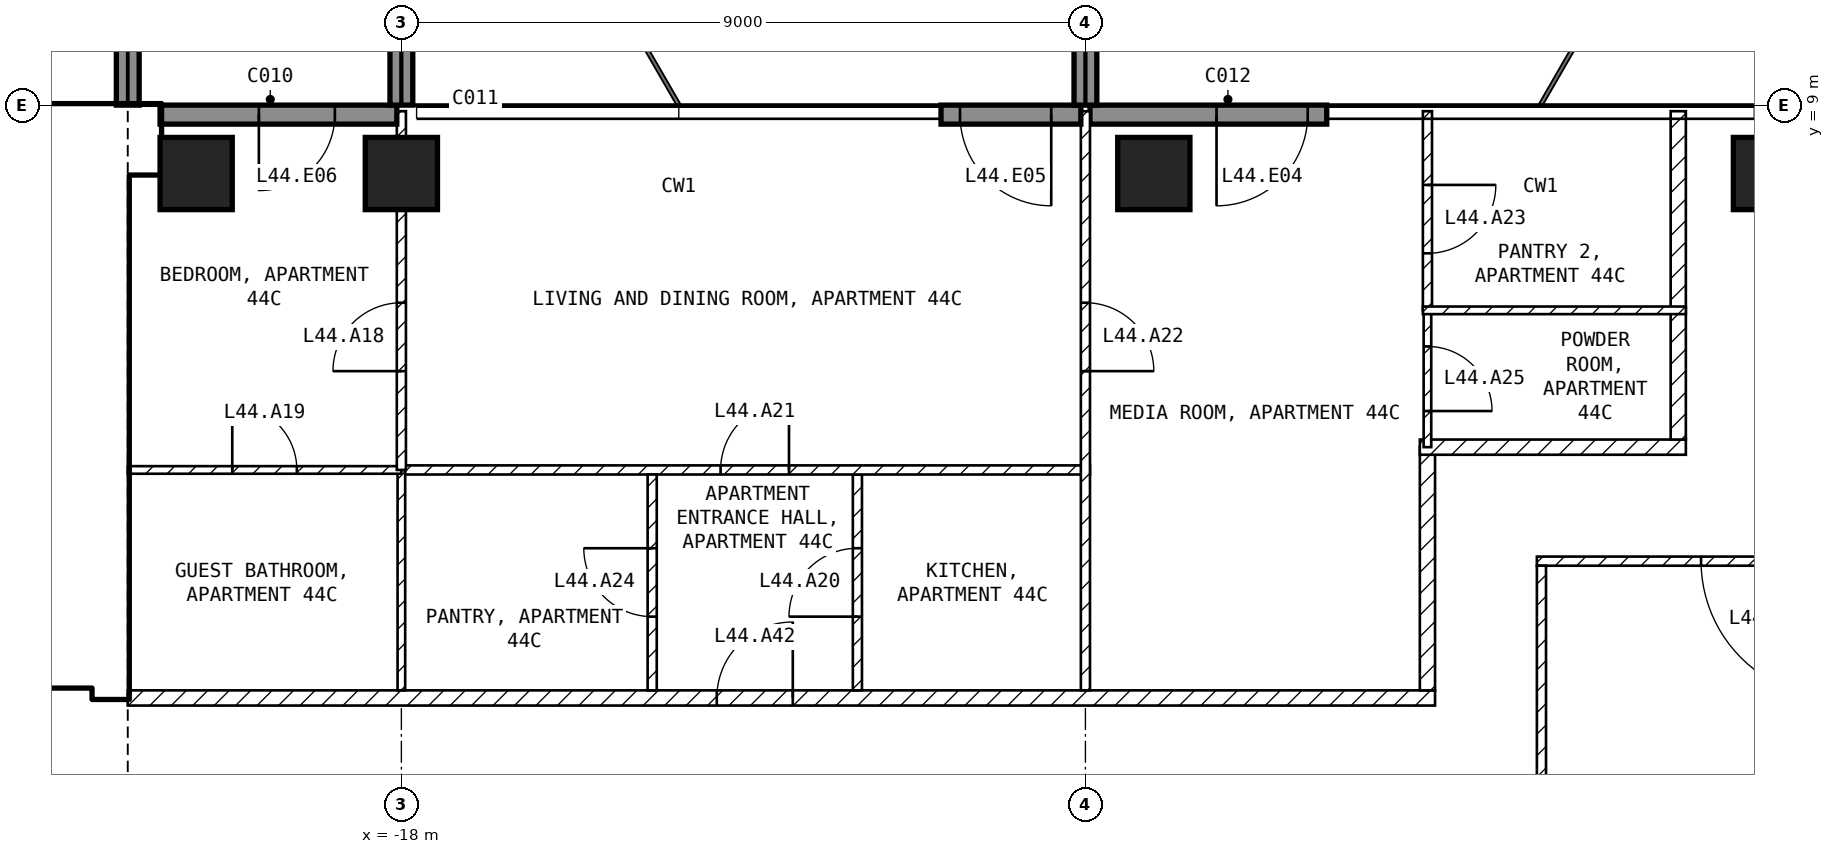
"""IFC4 building model, lengths in metres.
Left out: names, types, materials, properties, quantities, classifications, styles, units other than length and angle.
Written with IfcOpenShell. Run it as: python <this file> out.ifc"""

import sys

from ifc_helpers import new_model, si_unit, direction, frame, frame_2d, origin, origin_2d, place, context, subcontext, project, spatial, rectangle, extrude, element, fill, save


model = new_model("IFC4")
c1 = context("Model", 3, precision=1e-05, world=origin(), true_north=direction((0.0, 1.0)))
c2 = subcontext(c1, "Body", "Model", "MODEL_VIEW")
j1 = project(units=[si_unit("LENGTHUNIT", "METRE"), si_unit("PLANEANGLEUNIT", "RADIAN")], contexts=[c1])
p1 = place(None, origin())
s1 = spatial("IfcSite", under=j1, at=p1, CompositionType="ELEMENT")
p2 = place(p1, origin())
s2 = spatial("IfcBuilding", under=s1, at=p2, CompositionType="ELEMENT")
p3 = place(p2, frame((0.0, 0.0, 180.6)))
s3 = spatial("IfcBuildingStorey", under=s2, at=p3, CompositionType="ELEMENT", Elevation=180.6)
for number, where, z_axis, x_axis in (
    (1, (-20.7, 8.1, -0.25), (0.0, 0.0, 1.0), (1.0, 0.0, 0.0)),
    (2, (-18.0, 8.1, -0.25), (0.0, 0.0, 1.0), (1.0, 0.0, 0.0)),
    (3, (-8.1, 8.1, -0.25), (0.0, 0.0, 1.0), (1.0, 0.0, 0.0)),
    (4, (0.0, 8.1, -0.25), (0.0, 0.0, 1.0), (1.0, 0.0, 0.0)),
):
    element("IfcColumn", number, at=place(p3, frame(where, z_axis=z_axis, x_axis=x_axis)), inside=s3, PredefinedType="COLUMN", context=c2, shape_type="SweptSolid", body=[
        extrude(rectangle(XDim=0.95, YDim=0.95, at=origin_2d()), origin(), (0.0, 0.0, 1.0), 3.5),
    ])
p4 = place(p3, frame((-5.825, 8.875, 0.0), z_axis=(0.0, 0.0, 1.0), x_axis=(-1.0, 0.0, 0.0)))
e5 = element("IfcWall", 5, at=p4, inside=s3, PredefinedType="SOLIDWALL", context=c2, shape_type="SweptSolid", body=[
    extrude(rectangle(XDim=3.115, YDim=0.25, at=frame_2d((1.558, 0.0))), origin(), (0.0, 0.0, 1.0), 3.25),
])
p5 = place(p4, frame((0.25, 0.0, 0.0)))
e6 = element("IfcOpeningElement", 6, at=p5, cuts=e5, PredefinedType="OPENING", context=c2, shape_type="SweptSolid", body=[
    extrude(rectangle(XDim=1.2, YDim=2.4, at=frame_2d((0.6, 1.2))), frame((0.0, 0.135, 0.0), z_axis=(0.0, -1.0, 0.0), x_axis=(1.0, 0.0, 0.0)), (0.0, 0.0, 1.0), 0.27),
])
p6 = place(p3, frame((-9.06, 8.875, 0.0), z_axis=(0.0, 0.0, 1.0), x_axis=(-1.0, 0.0, 0.0)))
e7 = element("IfcWall", 7, at=p6, inside=s3, PredefinedType="SOLIDWALL", context=c2, shape_type="SweptSolid", body=[
    extrude(rectangle(XDim=1.84, YDim=0.25, at=frame_2d((0.92, 0.0))), origin(), (0.0, 0.0, 1.0), 3.25),
])
p7 = place(p6, frame((0.39, 0.0, 0.0)))
e8 = element("IfcOpeningElement", 8, at=p7, cuts=e7, PredefinedType="OPENING", context=c2, shape_type="SweptSolid", body=[
    extrude(rectangle(XDim=1.2, YDim=2.4, at=frame_2d((0.6, 1.2))), frame((0.0, 0.135, 0.0), z_axis=(0.0, -1.0, 0.0), x_axis=(1.0, 0.0, 0.0)), (0.0, 0.0, 1.0), 0.27),
])
p8 = place(p3, frame((-18.06, 8.875, 0.0), z_axis=(0.0, 0.0, 1.0), x_axis=(-1.0, 0.0, 0.0)))
e9 = element("IfcWall", 9, at=p8, inside=s3, PredefinedType="SOLIDWALL", context=c2, shape_type="SweptSolid", body=[
    extrude(rectangle(XDim=3.115, YDim=0.25, at=frame_2d((1.558, 0.0))), origin(), (0.0, 0.0, 1.0), 3.25),
])
p9 = place(p8, frame((0.815, 0.0, 0.0)))
e10 = element("IfcOpeningElement", 10, at=p9, cuts=e9, PredefinedType="OPENING", context=c2, shape_type="SweptSolid", body=[
    extrude(rectangle(XDim=1.0, YDim=2.4, at=frame_2d((0.5, 1.2))), frame((0.0, 0.135, 0.0), z_axis=(0.0, -1.0, 0.0), x_axis=(1.0, 0.0, 0.0)), (0.0, 0.0, 1.0), 0.27),
])
for number, where, z_axis, x_axis in (
    (11, (-21.6, 9.0, 0.0), (0.0, 0.0, 1.0), (0.0, 1.0, 0.0)),
    (12, (-18.0, 9.0, 0.0), (0.0, 0.0, 1.0), (0.0, 1.0, 0.0)),
    (13, (-9.0, 9.0, 0.0), (0.0, 0.0, 1.0), (0.0, 1.0, 0.0)),
):
    element("IfcWall", number, at=place(p3, frame(where, z_axis=z_axis, x_axis=x_axis)), inside=s3, PredefinedType="SOLIDWALL", context=c2, shape_type="SweptSolid", body=[
        extrude(rectangle(XDim=2.7, YDim=0.3, at=frame_2d((1.35, 0.0))), origin(), (0.0, 0.0, 1.0), 3.25),
    ])
p10 = place(p3, frame((-29.6, 8.55, 0.0), z_axis=(0.0, 0.0, 1.0), x_axis=(1.0, 0.0, 0.0)))
e14 = element("IfcWall", 14, at=p10, inside=s3, PredefinedType="SHEAR", context=c2, shape_type="SweptSolid", body=[
    extrude(rectangle(XDim=8.425, YDim=0.9, at=frame_2d((4.212, 0.0))), origin(), (0.0, 0.0, 1.0), 3.25),
])
p11 = place(p3, frame((-21.825, 1.2, 0.0), z_axis=(0.0, 0.0, 1.0), x_axis=(0.0, 1.0, 0.0)))
e15 = element("IfcWall", 15, at=p11, inside=s3, PredefinedType="SHEAR", context=c2, shape_type="SweptSolid", body=[
    extrude(rectangle(XDim=6.9, YDim=0.45, at=frame_2d((3.45, 0.0))), origin(), (0.0, 0.0, 1.0), 3.25),
])
p12 = place(p3, frame((-33.2, 1.45, 0.0), z_axis=(0.0, 0.0, 1.0), x_axis=(1.0, 0.0, 0.0)))
e16 = element("IfcWall", 16, at=p12, inside=s3, PredefinedType="SOLIDWALL", context=c2, shape_type="SweptSolid", body=[
    extrude(rectangle(XDim=11.15, YDim=0.2, at=frame_2d((5.575, 0.0))), origin(), (0.0, 0.0, 1.0), 3.25),
])
p13 = place(p12, frame((9.4, 0.0, 0.0)))
e17 = element("IfcOpeningElement", 17, at=p13, cuts=e16, PredefinedType="OPENING", context=c2, shape_type="SweptSolid", body=[
    extrude(rectangle(XDim=1.0, YDim=2.1, at=frame_2d((0.5, 1.05))), frame((0.0, 0.11, 0.0), z_axis=(0.0, -1.0, 0.0), x_axis=(1.0, 0.0, 0.0)), (0.0, 0.0, 1.0), 0.22),
])
p14 = place(p12, frame((6.9, 0.0, 0.0)))
e18 = element("IfcOpeningElement", 18, at=p14, cuts=e16, PredefinedType="OPENING", context=c2, shape_type="SweptSolid", body=[
    extrude(rectangle(XDim=1.0, YDim=2.1, at=frame_2d((0.5, 1.05))), frame((0.0, 0.11, 0.0), z_axis=(0.0, -1.0, 0.0), x_axis=(1.0, 0.0, 0.0)), (0.0, 0.0, 1.0), 0.22),
])
p15 = place(p12, frame((1.1, 0.0, 0.0)))
e19 = element("IfcOpeningElement", 19, at=p15, cuts=e16, PredefinedType="OPENING", context=c2, shape_type="SweptSolid", body=[
    extrude(rectangle(XDim=0.9, YDim=2.1, at=frame_2d((0.45, 1.05))), frame((0.0, 0.11, 0.0), z_axis=(0.0, -1.0, 0.0), x_axis=(1.0, 0.0, 0.0)), (0.0, 0.0, 1.0), 0.22),
])
p16 = place(p3, frame((-28.35, 5.15, 0.0), z_axis=(0.0, 0.0, 1.0), x_axis=(1.0, 0.0, 0.0)))
e20 = element("IfcWall", 20, at=p16, inside=s3, PredefinedType="SOLIDWALL", context=c2, shape_type="SweptSolid", body=[
    extrude(rectangle(XDim=6.3, YDim=0.2, at=frame_2d((3.15, 0.0))), origin(), (0.0, 0.0, 1.0), 3.25),
])
p17 = place(p16, frame((5.1, 0.0, 0.0)))
e21 = element("IfcOpeningElement", 21, at=p17, cuts=e20, PredefinedType="OPENING", context=c2, shape_type="SweptSolid", body=[
    extrude(rectangle(XDim=1.0, YDim=2.1, at=frame_2d((0.5, 1.05))), frame((0.0, 0.11, 0.0), z_axis=(0.0, -1.0, 0.0), x_axis=(1.0, 0.0, 0.0)), (0.0, 0.0, 1.0), 0.22),
])
p18 = place(p3, frame((3.06, 3.0, 0.0), z_axis=(0.0, 0.0, 1.0), x_axis=(-1.0, 0.0, 0.0)))
e22 = element("IfcWall", 22, at=p18, inside=s3, PredefinedType="PARTITIONING", context=c2, shape_type="SweptSolid", body=[
    extrude(rectangle(XDim=6.12, YDim=0.12, at=frame_2d((3.06, 0.0))), origin(), (0.0, 0.0, 1.0), 3.25),
])
p19 = place(p18, frame((2.16, 0.0, 0.0)))
e23 = element("IfcOpeningElement", 23, at=p19, cuts=e22, PredefinedType="OPENING", context=c2, shape_type="SweptSolid", body=[
    extrude(rectangle(XDim=1.8, YDim=2.1, at=frame_2d((0.9, 1.05))), frame((0.0, 0.07, 0.0), z_axis=(0.0, -1.0, 0.0), x_axis=(1.0, 0.0, 0.0)), (0.0, 0.0, 1.0), 0.14),
])
p20 = place(p3, frame((-3.0, 2.94, 0.0), z_axis=(0.0, 0.0, 1.0), x_axis=(0.0, -1.0, 0.0)))
e24 = element("IfcWall", 24, at=p20, inside=s3, PredefinedType="PARTITIONING", context=c2, shape_type="SweptSolid", body=[
    extrude(rectangle(XDim=5.88, YDim=0.12, at=frame_2d((2.94, 0.0))), origin(), (0.0, 0.0, 1.0), 3.25),
])
p21 = place(p3, frame((-21.6, 1.2, 0.0), z_axis=(0.0, 0.0, 1.0), x_axis=(1.0, 0.0, 0.0)))
e25 = element("IfcWall", 25, at=p21, inside=s3, PredefinedType="PARTITIONING", context=c2, shape_type="SweptSolid", body=[
    extrude(rectangle(XDim=17.2, YDim=0.2, at=frame_2d((8.6, 0.0))), origin(), (0.0, 0.0, 1.0), 3.25),
])
p22 = place(p21, frame((7.75, 0.0, 0.0)))
e26 = element("IfcOpeningElement", 26, at=p22, cuts=e25, PredefinedType="OPENING", context=c2, shape_type="SweptSolid", body=[
    extrude(rectangle(XDim=1.0, YDim=2.1, at=frame_2d((0.5, 1.05))), frame((0.0, 0.11, 0.0), z_axis=(0.0, -1.0, 0.0), x_axis=(1.0, 0.0, 0.0)), (0.0, 0.0, 1.0), 0.22),
])
p23 = place(p3, frame((-4.5, 1.3, 0.0), z_axis=(0.0, 0.0, 1.0), x_axis=(0.0, 1.0, 0.0)))
e27 = element("IfcWall", 27, at=p23, inside=s3, PredefinedType="PARTITIONING", context=c2, shape_type="SweptSolid", body=[
    extrude(rectangle(XDim=3.2, YDim=0.2, at=frame_2d((1.6, 0.0))), origin(), (0.0, 0.0, 1.0), 3.25),
])
p24 = place(p3, frame((-4.6, 4.5, 0.0), z_axis=(0.0, 0.0, 1.0), x_axis=(1.0, 0.0, 0.0)))
e28 = element("IfcWall", 28, at=p24, inside=s3, PredefinedType="PARTITIONING", context=c2, shape_type="SweptSolid", body=[
    extrude(rectangle(XDim=3.5, YDim=0.2, at=frame_2d((1.75, 0.0))), origin(), (0.0, 0.0, 1.0), 3.25),
])
p25 = place(p3, frame((-1.2, 4.6, 0.0), z_axis=(0.0, 0.0, 1.0), x_axis=(0.0, 1.0, 0.0)))
e29 = element("IfcWall", 29, at=p25, inside=s3, PredefinedType="PARTITIONING", context=c2, shape_type="SweptSolid", body=[
    extrude(rectangle(XDim=4.32, YDim=0.2, at=frame_2d((2.16, 0.0))), origin(), (0.0, 0.0, 1.0), 3.25),
])
p26 = place(p3, frame((-12.0, 1.3, 0.0), z_axis=(0.0, 0.0, 1.0), x_axis=(0.0, 1.0, 0.0)))
e30 = element("IfcWall", 30, at=p26, inside=s3, PredefinedType="PARTITIONING", context=c2, shape_type="SweptSolid", body=[
    extrude(rectangle(XDim=2.84, YDim=0.12, at=frame_2d((1.42, 0.0))), origin(), (0.0, 0.0, 1.0), 3.25),
])
p27 = place(p26, frame((0.97, 0.0, 0.0)))
e31 = element("IfcOpeningElement", 31, at=p27, cuts=e30, PredefinedType="OPENING", context=c2, shape_type="SweptSolid", body=[
    extrude(rectangle(XDim=0.9, YDim=2.1, at=frame_2d((0.45, 1.05))), frame((0.0, 0.07, 0.0), z_axis=(0.0, -1.0, 0.0), x_axis=(1.0, 0.0, 0.0)), (0.0, 0.0, 1.0), 0.14),
])
p28 = place(p3, frame((-18.0, 4.2, 0.0), z_axis=(0.0, 0.0, 1.0), x_axis=(1.0, 0.0, 0.0)))
e32 = element("IfcWall", 32, at=p28, inside=s3, PredefinedType="PARTITIONING", context=c2, shape_type="SweptSolid", body=[
    extrude(rectangle(XDim=9.06, YDim=0.12, at=frame_2d((4.53, 0.0))), origin(), (0.0, 0.0, 1.0), 3.25),
])
p29 = place(p28, frame((4.2, 0.0, 0.0)))
e33 = element("IfcOpeningElement", 33, at=p29, cuts=e32, PredefinedType="OPENING", context=c2, shape_type="SweptSolid", body=[
    extrude(rectangle(XDim=0.9, YDim=2.1, at=frame_2d((0.45, 1.05))), frame((0.0, 0.07, 0.0), z_axis=(0.0, -1.0, 0.0), x_axis=(1.0, 0.0, 0.0)), (0.0, 0.0, 1.0), 0.14),
])
p30 = place(p3, frame((-9.0, 8.92, 0.0), z_axis=(0.0, 0.0, 1.0), x_axis=(0.0, -1.0, 0.0)))
e34 = element("IfcWall", 34, at=p30, inside=s3, PredefinedType="PARTITIONING", context=c2, shape_type="SweptSolid", body=[
    extrude(rectangle(XDim=7.62, YDim=0.12, at=frame_2d((3.81, 0.0))), origin(), (0.0, 0.0, 1.0), 3.25),
])
p31 = place(p30, frame((2.52, 0.0, 0.0)))
e35 = element("IfcOpeningElement", 35, at=p31, cuts=e34, PredefinedType="OPENING", context=c2, shape_type="SweptSolid", body=[
    extrude(rectangle(XDim=0.9, YDim=2.1, at=frame_2d((0.45, 1.05))), frame((0.0, 0.07, 0.0), z_axis=(0.0, -1.0, 0.0), x_axis=(1.0, 0.0, 0.0)), (0.0, 0.0, 1.0), 0.14),
])
p32 = place(p3, frame((-14.7, 1.3, 0.0), z_axis=(0.0, 0.0, 1.0), x_axis=(0.0, 1.0, 0.0)))
e36 = element("IfcWall", 36, at=p32, inside=s3, PredefinedType="PARTITIONING", context=c2, shape_type="SweptSolid", body=[
    extrude(rectangle(XDim=2.84, YDim=0.12, at=frame_2d((1.42, 0.0))), origin(), (0.0, 0.0, 1.0), 3.25),
])
p33 = place(p32, frame((0.97, 0.0, 0.0)))
e37 = element("IfcOpeningElement", 37, at=p33, cuts=e36, PredefinedType="OPENING", context=c2, shape_type="SweptSolid", body=[
    extrude(rectangle(XDim=0.9, YDim=2.1, at=frame_2d((0.45, 1.05))), frame((0.0, 0.07, 0.0), z_axis=(0.0, -1.0, 0.0), x_axis=(1.0, 0.0, 0.0)), (0.0, 0.0, 1.0), 0.14),
])
p34 = place(p3, frame((-18.0, 1.3, 0.0), z_axis=(0.0, 0.0, 1.0), x_axis=(0.0, 1.0, 0.0)))
e38 = element("IfcWall", 38, at=p34, inside=s3, PredefinedType="PARTITIONING", context=c2, shape_type="SweptSolid", body=[
    extrude(rectangle(XDim=2.9, YDim=0.1, at=frame_2d((1.45, 0.0))), origin(), (0.0, 0.0, 1.0), 2.48),
])
p35 = place(p3, frame((-21.6, 4.2, 0.0), z_axis=(0.0, 0.0, 1.0), x_axis=(1.0, 0.0, 0.0)))
e39 = element("IfcWall", 39, at=p35, inside=s3, PredefinedType="PARTITIONING", context=c2, shape_type="SweptSolid", body=[
    extrude(rectangle(XDim=3.6, YDim=0.1, at=frame_2d((1.8, 0.0))), origin(), (0.0, 0.0, 1.0), 3.25),
])
p36 = place(p35, frame((1.375, 0.0, 0.0)))
e40 = element("IfcOpeningElement", 40, at=p36, cuts=e39, PredefinedType="OPENING", context=c2, shape_type="SweptSolid", body=[
    extrude(rectangle(XDim=0.85, YDim=2.1, at=frame_2d((0.425, 1.05))), frame((0.0, 0.06, 0.0), z_axis=(0.0, -1.0, 0.0), x_axis=(1.0, 0.0, 0.0)), (0.0, 0.0, 1.0), 0.12),
])
p37 = place(p3, frame((-18.0, 4.2, 0.0), z_axis=(0.0, 0.0, 1.0), x_axis=(0.0, 1.0, 0.0)))
e41 = element("IfcWall", 41, at=p37, inside=s3, PredefinedType="PARTITIONING", context=c2, shape_type="SweptSolid", body=[
    extrude(rectangle(XDim=4.72, YDim=0.12, at=frame_2d((2.36, 0.0))), origin(), (0.0, 0.0, 1.0), 2.48),
])
p38 = place(p37, frame((1.3, 0.0, 0.0)))
e42 = element("IfcOpeningElement", 42, at=p38, cuts=e41, PredefinedType="OPENING", context=c2, shape_type="SweptSolid", body=[
    extrude(rectangle(XDim=0.9, YDim=2.1, at=frame_2d((0.45, 1.05))), frame((0.0, 0.07, 0.0), z_axis=(0.0, -1.0, 0.0), x_axis=(1.0, 0.0, 0.0)), (0.0, 0.0, 1.0), 0.14),
])
p39 = place(p3, frame((-4.5, 6.3, 0.0), z_axis=(0.0, 0.0, 1.0), x_axis=(0.0, -1.0, 0.0)))
e43 = element("IfcWall", 43, at=p39, inside=s3, PredefinedType="PARTITIONING", context=c2, shape_type="SweptSolid", body=[
    extrude(rectangle(XDim=1.8, YDim=0.1, at=frame_2d((0.9, 0.0))), origin(), (0.0, 0.0, 1.0), 3.25),
])
p40 = place(p39, frame((0.475, 0.0, 0.0)))
e44 = element("IfcOpeningElement", 44, at=p40, cuts=e43, PredefinedType="OPENING", context=c2, shape_type="SweptSolid", body=[
    extrude(rectangle(XDim=0.85, YDim=2.1, at=frame_2d((0.425, 1.05))), frame((0.0, 0.06, 0.0), z_axis=(0.0, -1.0, 0.0), x_axis=(1.0, 0.0, 0.0)), (0.0, 0.0, 1.0), 0.12),
])
p41 = place(p3, frame((-4.5, 8.92, 0.0), z_axis=(0.0, 0.0, 1.0), x_axis=(0.0, -1.0, 0.0)))
e45 = element("IfcWall", 45, at=p41, inside=s3, PredefinedType="PARTITIONING", context=c2, shape_type="SweptSolid", body=[
    extrude(rectangle(XDim=2.62, YDim=0.12, at=frame_2d((1.31, 0.0))), origin(), (0.0, 0.0, 1.0), 3.25),
])
p42 = place(p41, frame((0.97, 0.0, 0.0)))
e46 = element("IfcOpeningElement", 46, at=p42, cuts=e45, PredefinedType="OPENING", context=c2, shape_type="SweptSolid", body=[
    extrude(rectangle(XDim=0.9, YDim=2.1, at=frame_2d((0.45, 1.05))), frame((0.0, 0.07, 0.0), z_axis=(0.0, -1.0, 0.0), x_axis=(1.0, 0.0, 0.0)), (0.0, 0.0, 1.0), 0.14),
])
p43 = place(p3, frame((-4.56, 6.3, 0.0), z_axis=(0.0, 0.0, 1.0), x_axis=(1.0, 0.0, 0.0)))
e47 = element("IfcWall", 47, at=p43, inside=s3, PredefinedType="PARTITIONING", context=c2, shape_type="SweptSolid", body=[
    extrude(rectangle(XDim=3.46, YDim=0.1, at=frame_2d((1.73, 0.0))), origin(), (0.0, 0.0, 1.0), 3.25),
])
p44 = place(p5, origin())
e48 = element("IfcDoor", 48, at=p44, inside=s3, OperationType="SINGLE_SWING_RIGHT", PredefinedType="DOOR", context=c2, shape_type="SweptSolid", body=[
    extrude(rectangle(XDim=1.2, YDim=2.4, at=frame_2d((0.6, 1.2))), frame((0.0, 0.025, 0.0), z_axis=(0.0, -1.0, 0.0), x_axis=(1.0, 0.0, 0.0)), (0.0, 0.0, 1.0), 0.05),
])
fill(e6, e48)
p45 = place(p7, origin())
e49 = element("IfcDoor", 49, at=p45, inside=s3, OperationType="SINGLE_SWING_LEFT", PredefinedType="DOOR", context=c2, shape_type="SweptSolid", body=[
    extrude(rectangle(XDim=1.2, YDim=2.4, at=frame_2d((0.6, 1.2))), frame((0.0, 0.025, 0.0), z_axis=(0.0, -1.0, 0.0), x_axis=(1.0, 0.0, 0.0)), (0.0, 0.0, 1.0), 0.05),
])
fill(e8, e49)
p46 = place(p9, origin())
e50 = element("IfcDoor", 50, at=p46, inside=s3, OperationType="SINGLE_SWING_RIGHT", PredefinedType="DOOR", context=c2, shape_type="SweptSolid", body=[
    extrude(rectangle(XDim=1.0, YDim=2.4, at=frame_2d((0.5, 1.2))), frame((0.0, 0.025, 0.0), z_axis=(0.0, -1.0, 0.0), x_axis=(1.0, 0.0, 0.0)), (0.0, 0.0, 1.0), 0.05),
])
fill(e10, e50)
p47 = place(p17, origin())
e51 = element("IfcDoor", 51, at=p47, inside=s3, OperationType="SINGLE_SWING_LEFT", PredefinedType="DOOR", context=c2, shape_type="SweptSolid", body=[
    extrude(rectangle(XDim=1.0, YDim=2.1, at=frame_2d((0.5, 1.05))), frame((0.0, 0.025, 0.0), z_axis=(0.0, -1.0, 0.0), x_axis=(1.0, 0.0, 0.0)), (0.0, 0.0, 1.0), 0.05),
])
fill(e21, e51)
p48 = place(p19, origin())
e52 = element("IfcDoor", 52, at=p48, inside=s3, OperationType="SINGLE_SWING_LEFT", PredefinedType="DOOR", context=c2, shape_type="SweptSolid", body=[
    extrude(rectangle(XDim=1.8, YDim=2.1, at=frame_2d((0.9, 1.05))), frame((0.0, 0.025, 0.0), z_axis=(0.0, -1.0, 0.0), x_axis=(1.0, 0.0, 0.0)), (0.0, 0.0, 1.0), 0.05),
])
fill(e23, e52)
p49 = place(p38, origin())
e53 = element("IfcDoor", 53, at=p49, inside=s3, OperationType="SINGLE_SWING_LEFT", PredefinedType="DOOR", context=c2, shape_type="SweptSolid", body=[
    extrude(rectangle(XDim=0.9, YDim=2.1, at=frame_2d((0.45, 1.05))), frame((0.0, 0.025, 0.0), z_axis=(0.0, -1.0, 0.0), x_axis=(1.0, 0.0, 0.0)), (0.0, 0.0, 1.0), 0.05),
])
fill(e42, e53)
p50 = place(p36, origin())
e54 = element("IfcDoor", 54, at=p50, inside=s3, OperationType="SINGLE_SWING_LEFT", PredefinedType="DOOR", context=c2, shape_type="SweptSolid", body=[
    extrude(rectangle(XDim=0.85, YDim=2.1, at=frame_2d((0.425, 1.05))), frame((0.0, 0.025, 0.0), z_axis=(0.0, -1.0, 0.0), x_axis=(1.0, 0.0, 0.0)), (0.0, 0.0, 1.0), 0.05),
])
fill(e40, e54)
p51 = place(p27, origin())
e55 = element("IfcDoor", 55, at=p51, inside=s3, OperationType="SINGLE_SWING_LEFT", PredefinedType="DOOR", context=c2, shape_type="SweptSolid", body=[
    extrude(rectangle(XDim=0.9, YDim=2.1, at=frame_2d((0.45, 1.05))), frame((0.0, 0.025, 0.0), z_axis=(0.0, -1.0, 0.0), x_axis=(1.0, 0.0, 0.0)), (0.0, 0.0, 1.0), 0.05),
])
fill(e31, e55)
p52 = place(p29, origin())
e56 = element("IfcDoor", 56, at=p52, inside=s3, OperationType="SINGLE_SWING_RIGHT", PredefinedType="DOOR", context=c2, shape_type="SweptSolid", body=[
    extrude(rectangle(XDim=0.9, YDim=2.1, at=frame_2d((0.45, 1.05))), frame((0.0, 0.025, 0.0), z_axis=(0.0, -1.0, 0.0), x_axis=(1.0, 0.0, 0.0)), (0.0, 0.0, 1.0), 0.05),
])
fill(e33, e56)
p53 = place(p31, origin())
e57 = element("IfcDoor", 57, at=p53, inside=s3, OperationType="SINGLE_SWING_RIGHT", PredefinedType="DOOR", context=c2, shape_type="SweptSolid", body=[
    extrude(rectangle(XDim=0.9, YDim=2.1, at=frame_2d((0.45, 1.05))), frame((0.0, 0.025, 0.0), z_axis=(0.0, -1.0, 0.0), x_axis=(1.0, 0.0, 0.0)), (0.0, 0.0, 1.0), 0.05),
])
fill(e35, e57)
p54 = place(p42, origin())
e58 = element("IfcDoor", 58, at=p54, inside=s3, OperationType="SINGLE_SWING_LEFT", PredefinedType="DOOR", context=c2, shape_type="SweptSolid", body=[
    extrude(rectangle(XDim=0.9, YDim=2.1, at=frame_2d((0.45, 1.05))), frame((0.0, 0.025, 0.0), z_axis=(0.0, -1.0, 0.0), x_axis=(1.0, 0.0, 0.0)), (0.0, 0.0, 1.0), 0.05),
])
fill(e46, e58)
p55 = place(p33, origin())
e59 = element("IfcDoor", 59, at=p55, inside=s3, OperationType="SINGLE_SWING_RIGHT", PredefinedType="DOOR", context=c2, shape_type="SweptSolid", body=[
    extrude(rectangle(XDim=0.9, YDim=2.1, at=frame_2d((0.45, 1.05))), frame((0.0, 0.025, 0.0), z_axis=(0.0, -1.0, 0.0), x_axis=(1.0, 0.0, 0.0)), (0.0, 0.0, 1.0), 0.05),
])
fill(e37, e59)
p56 = place(p40, origin())
e60 = element("IfcDoor", 60, at=p56, inside=s3, OperationType="SINGLE_SWING_RIGHT", PredefinedType="DOOR", context=c2, shape_type="SweptSolid", body=[
    extrude(rectangle(XDim=0.85, YDim=2.1, at=frame_2d((0.425, 1.05))), frame((0.0, 0.025, 0.0), z_axis=(0.0, -1.0, 0.0), x_axis=(1.0, 0.0, 0.0)), (0.0, 0.0, 1.0), 0.05),
])
fill(e44, e60)
p57 = place(p22, origin())
e61 = element("IfcDoor", 61, at=p57, inside=s3, OperationType="SINGLE_SWING_RIGHT", PredefinedType="DOOR", context=c2, shape_type="SweptSolid", body=[
    extrude(rectangle(XDim=1.0, YDim=2.1, at=frame_2d((0.5, 1.05))), frame((0.0, 0.025, 0.0), z_axis=(0.0, -1.0, 0.0), x_axis=(1.0, 0.0, 0.0)), (0.0, 0.0, 1.0), 0.05),
])
fill(e26, e61)
save(model, sys.argv[1])
